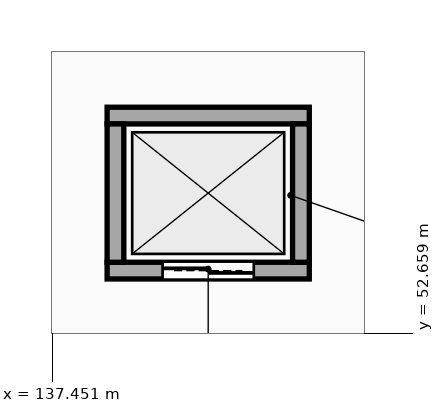
"""IFC4 building model, lengths in metres.
Left out: names, types, materials, properties, quantities, classifications, styles, units other than length and angle.
Written with IfcOpenShell. Run it as: python <this file> out.ifc"""

import sys

from ifc_helpers import new_model, si_unit, direction, frame, frame_2d, origin, place, context, subcontext, project, spatial, rectangle, extrude, element, fill, save


model = new_model("IFC4")
c1 = context("Model", 3, precision=1e-05, world=origin(), true_north=direction((0.0, 1.0)))
c2 = subcontext(c1, "Body", "Model", "MODEL_VIEW")
j1 = project(units=[si_unit("LENGTHUNIT", "METRE"), si_unit("PLANEANGLEUNIT", "RADIAN")], contexts=[c1])
p1 = place(None, origin())
s1 = spatial("IfcSite", under=j1, at=p1, CompositionType="ELEMENT")
p2 = place(p1, origin())
s2 = spatial("IfcBuilding", under=s1, at=p2, CompositionType="ELEMENT")
p3 = place(p2, frame((0.0, 0.0, -5.4)))
s3 = spatial("IfcBuildingStorey", under=s2, at=p3, CompositionType="ELEMENT", Elevation=-5.4)
p4 = place(p3, frame((138.17, 53.48, 0.0), z_axis=(0.0, 0.0, 1.0), x_axis=(1.0, 0.0, 0.0)))
e1 = element("IfcWall", 1, at=p4, inside=s3, PredefinedType="STANDARD", context=c2, shape_type="SweptSolid", body=[
    extrude(rectangle(XDim=2.66, YDim=0.22, at=frame_2d((1.33, 0.0))), origin(), (0.0, 0.0, 1.0), 4.95),
])
p5 = place(p4, frame((0.73, 0.0, 0.0)))
e2 = element("IfcOpeningElement", 2, at=p5, cuts=e1, PredefinedType="OPENING", context=c2, shape_type="SweptSolid", body=[
    extrude(rectangle(XDim=1.2, YDim=2.2, at=frame_2d((0.6, 1.1))), frame((0.0, 0.12, 0.0), z_axis=(0.0, -1.0, 0.0), x_axis=(1.0, 0.0, 0.0)), (0.0, 0.0, 1.0), 0.24),
])
p6 = place(p3, frame((140.83, 55.52, 0.0), z_axis=(0.0, 0.0, 1.0), x_axis=(-1.0, 0.0, 0.0)))
e3 = element("IfcWall", 3, at=p6, inside=s3, PredefinedType="STANDARD", context=c2, shape_type="SweptSolid", body=[
    extrude(rectangle(XDim=2.66, YDim=0.22, at=frame_2d((1.33, 0.0))), origin(), (0.0, 0.0, 1.0), 4.95),
])
for number, where, z_axis, x_axis in (
    (4, (138.28, 55.41, 0.0), (0.0, 0.0, 1.0), (0.0, -1.0, 0.0)),
    (5, (140.72, 53.59, 0.0), (0.0, 0.0, 1.0), (0.0, 1.0, 0.0)),
):
    element("IfcWall", number, at=place(p3, frame(where, z_axis=z_axis, x_axis=x_axis)), inside=s3, PredefinedType="STANDARD", context=c2, shape_type="SweptSolid", body=[
        extrude(rectangle(XDim=1.82, YDim=0.22, at=frame_2d((0.91, 0.0))), origin(), (0.0, 0.0, 1.0), 4.95),
    ])
p7 = place(p5, origin())
e6 = element("IfcDoor", 6, at=p7, inside=s3, OperationType="DOUBLE_DOOR_SLIDING", PredefinedType="DOOR", context=c2, shape_type="SweptSolid", body=[
    extrude(rectangle(XDim=1.2, YDim=2.2, at=frame_2d((0.6, 1.1))), frame((0.0, 0.025, 0.0), z_axis=(0.0, -1.0, 0.0), x_axis=(1.0, 0.0, 0.0)), (0.0, 0.0, 1.0), 0.05),
])
fill(e2, e6)
save(model, sys.argv[1])
